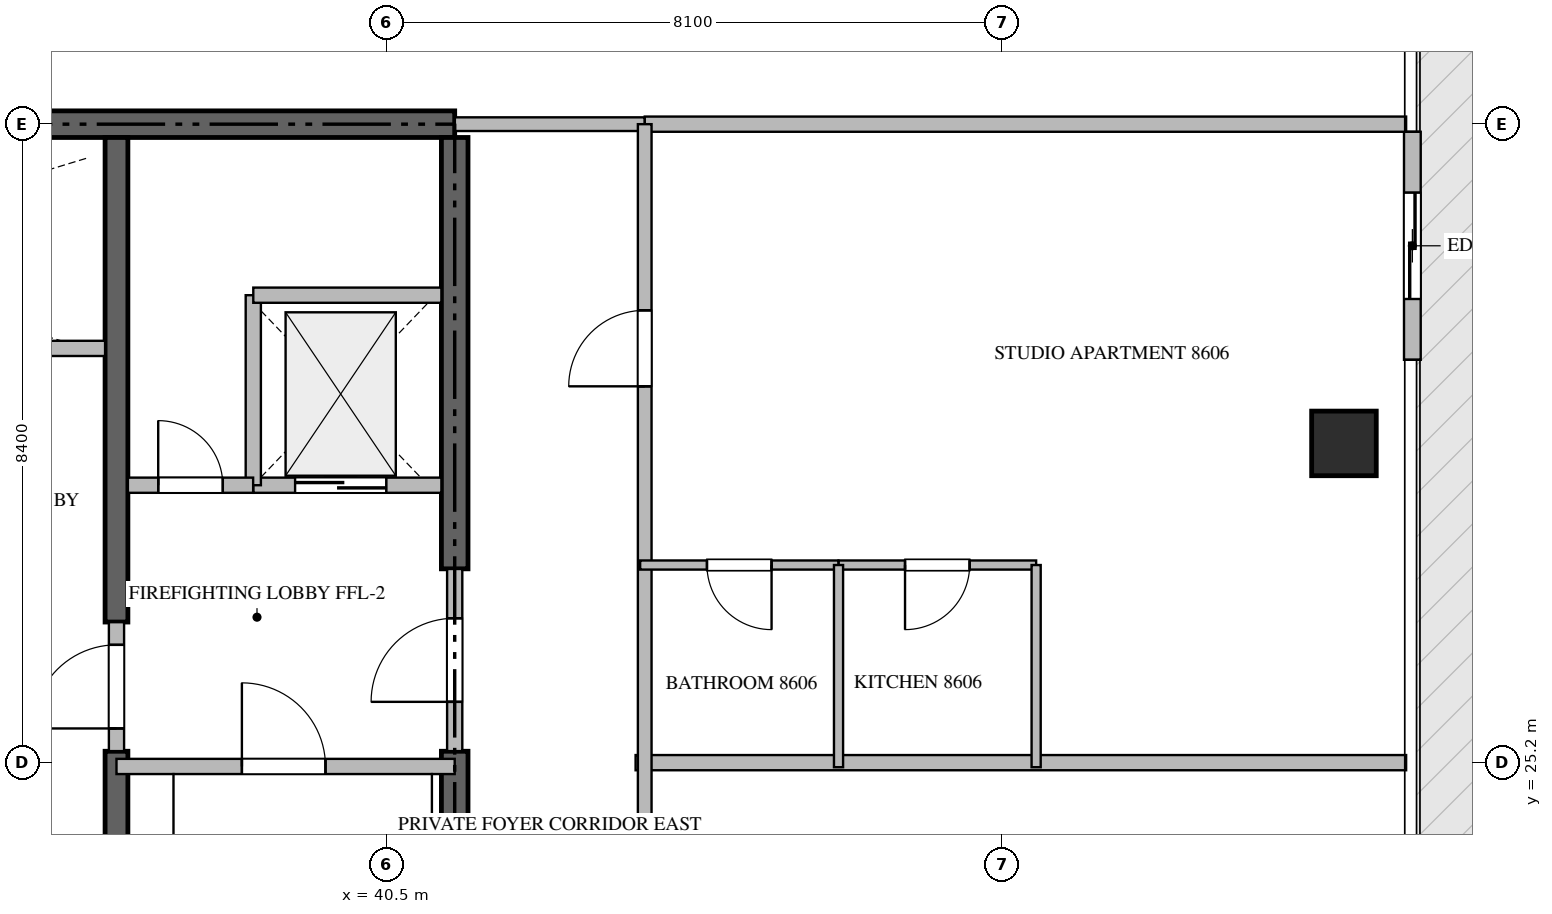
"""IFC4 building model, lengths in metres.
Left out: names, types, materials, properties, quantities, classifications, styles, units other than length and angle.
Written with IfcOpenShell. Run it as: python <this file> out.ifc"""

import sys

from ifc_helpers import new_model, si_unit, direction, frame, frame_2d, origin, origin_2d, place, context, subcontext, project, spatial, rectangle, extrude, source, transform, mapped, element, fill, save


model = new_model("IFC4")
c1 = context("Model", 3, precision=1e-05, world=origin(), true_north=direction((0.0, 1.0)))
c2 = subcontext(c1, "Body", "Model", "MODEL_VIEW")
j1 = project(units=[si_unit("LENGTHUNIT", "METRE"), si_unit("PLANEANGLEUNIT", "RADIAN")], contexts=[c1])
p1 = place(None, origin())
s1 = spatial("IfcSite", under=j1, at=p1, CompositionType="ELEMENT")
p2 = place(p1, origin())
s2 = spatial("IfcBuilding", under=s1, at=p2, CompositionType="ELEMENT")
p3 = place(p2, frame((0.0, 0.0, 347.95)))
s3 = spatial("IfcBuildingStorey", under=s2, at=p3, CompositionType="ELEMENT", Elevation=347.95)
p4 = place(p3, frame((41.4, 33.6, -0.26), z_axis=(0.0, 0.0, 1.0), x_axis=(-1.0, 0.0, 0.0)))
e1 = element("IfcWall", 1, at=p4, inside=s3, PredefinedType="SHEAR", context=c2, shape_type="SweptSolid", body=[
    extrude(rectangle(XDim=18.0, YDim=0.35, at=frame_2d((9.0, 0.0))), origin(), (0.0, 0.0, 1.0), 5.898),
])
p5 = place(p3, frame((41.4, 16.975, -0.26), z_axis=(0.0, 0.0, 1.0), x_axis=(0.0, 1.0, 0.0)))
e2 = element("IfcWall", 2, at=p5, inside=s3, PredefinedType="SHEAR", context=c2, shape_type="SweptSolid", body=[
    extrude(rectangle(XDim=8.375, YDim=0.35, at=frame_2d((4.188, 0.0))), origin(), (0.0, 0.0, 1.0), 5.898),
])
p6 = place(p3, frame((41.4, 27.75, -0.26), z_axis=(0.0, 0.0, 1.0), x_axis=(0.0, 1.0, 0.0)))
e3 = element("IfcWall", 3, at=p6, inside=s3, PredefinedType="SHEAR", context=c2, shape_type="SweptSolid", body=[
    extrude(rectangle(XDim=5.675, YDim=0.35, at=frame_2d((2.837, 0.0))), origin(), (0.0, 0.0, 1.0), 5.898),
])
p7 = place(p3, frame((36.95, 16.975, -0.26), z_axis=(0.0, 0.0, 1.0), x_axis=(0.0, 1.0, 0.0)))
e4 = element("IfcWall", 4, at=p7, inside=s3, PredefinedType="SHEAR", context=c2, shape_type="SweptSolid", body=[
    extrude(rectangle(XDim=8.375, YDim=0.3, at=frame_2d((4.188, 0.0))), origin(), (0.0, 0.0, 1.0), 5.898),
])
p8 = place(p3, frame((36.95, 27.05, -0.26), z_axis=(0.0, 0.0, 1.0), x_axis=(0.0, 1.0, 0.0)))
e5 = element("IfcWall", 5, at=p8, inside=s3, PredefinedType="SHEAR", context=c2, shape_type="SweptSolid", body=[
    extrude(rectangle(XDim=6.375, YDim=0.3, at=frame_2d((3.188, 0.0))), origin(), (0.0, 0.0, 1.0), 5.898),
])
m1 = source(origin(), c2, "Body", "SweptSolid", [
    extrude(rectangle(XDim=0.85, YDim=0.85, at=origin_2d()), origin(), (0.0, 0.0, 1.0), 5.9),
])
p9 = place(p3, frame((53.1, 29.4, -0.26), z_axis=(0.0, 0.0, 1.0), x_axis=(1.0, 0.0, 0.0)))
e6 = element("IfcColumn", 6, at=p9, inside=s3, PredefinedType="COLUMN", context=c2, shape_type="MappedRepresentation", body=[
    mapped(m1, transform((0.0, 0.0, 0.0), scale=1.0)),
])
p10 = place(p3, frame((54.0, 30.5, 0.0), z_axis=(0.0, 0.0, 1.0), x_axis=(0.0, 1.0, 0.0)))
e7 = element("IfcWall", 7, at=p10, inside=s3, PredefinedType="ELEMENTEDWALL", context=c2, shape_type="SweptSolid", body=[
    extrude(rectangle(XDim=3.0, YDim=0.22, at=frame_2d((1.5, 0.0))), origin(), (0.0, 0.0, 1.0), 5.625),
])
p11 = place(p10, frame((0.8, 0.0, 0.0)))
e8 = element("IfcOpeningElement", 8, at=p11, cuts=e7, PredefinedType="OPENING", context=c2, shape_type="SweptSolid", body=[
    extrude(rectangle(XDim=1.4, YDim=2.25, at=frame_2d((0.7, 1.125))), frame((0.0, 0.12, 0.0), z_axis=(0.0, -1.0, 0.0), x_axis=(1.0, 0.0, 0.0)), (0.0, 0.0, 1.0), 0.24),
])
p12 = place(p3, frame((36.95, 25.15, 0.0), z_axis=(0.0, 0.0, 1.0), x_axis=(1.0, 0.0, 0.0)))
e9 = element("IfcWall", 9, at=p12, inside=s3, PredefinedType="STANDARD", context=c2, shape_type="SweptSolid", body=[
    extrude(rectangle(XDim=4.45, YDim=0.2, at=frame_2d((2.225, 0.0))), origin(), (0.0, 0.0, 1.0), 5.64),
])
p13 = place(p12, frame((1.65, 0.0, 0.0)))
e10 = element("IfcOpeningElement", 10, at=p13, cuts=e9, PredefinedType="OPENING", context=c2, shape_type="SweptSolid", body=[
    extrude(rectangle(XDim=1.1, YDim=2.15, at=frame_2d((0.55, 1.075))), frame((0.0, 0.11, 0.0), z_axis=(0.0, -1.0, 0.0), x_axis=(1.0, 0.0, 0.0)), (0.0, 0.0, 1.0), 0.22),
])
p14 = place(p3, frame((38.75, 28.85, 0.0), z_axis=(0.0, 0.0, 1.0), x_axis=(1.0, 0.0, 0.0)))
e11 = element("IfcWall", 11, at=p14, inside=s3, PredefinedType="STANDARD", context=c2, shape_type="SweptSolid", body=[
    extrude(rectangle(XDim=2.475, YDim=0.2, at=frame_2d((1.238, 0.0))), origin(), (0.0, 0.0, 1.0), 5.64),
])
p15 = place(p14, frame((0.55, 0.0, 0.0)))
e12 = element("IfcOpeningElement", 12, at=p15, cuts=e11, PredefinedType="OPENING", context=c2, shape_type="SweptSolid", body=[
    extrude(rectangle(XDim=1.2, YDim=2.2, at=frame_2d((0.6, 1.1))), frame((0.0, 0.11, 0.0), z_axis=(0.0, -1.0, 0.0), x_axis=(1.0, 0.0, 0.0)), (0.0, 0.0, 1.0), 0.22),
])
p16 = place(p3, frame((35.0, 30.65, 0.0), z_axis=(0.0, 0.0, 1.0), x_axis=(1.0, 0.0, 0.0)))
e13 = element("IfcWall", 13, at=p16, inside=s3, PredefinedType="STANDARD", context=c2, shape_type="SweptSolid", body=[
    extrude(rectangle(XDim=1.8, YDim=0.2, at=frame_2d((0.9, 0.0))), origin(), (0.0, 0.0, 1.0), 5.64),
])
p17 = place(p3, frame((38.75, 28.85, 0.0), z_axis=(0.0, 0.0, 1.0), x_axis=(0.0, 1.0, 0.0)))
e14 = element("IfcWall", 14, at=p17, inside=s3, PredefinedType="STANDARD", context=c2, shape_type="SweptSolid", body=[
    extrude(rectangle(XDim=2.5, YDim=0.2, at=frame_2d((1.25, 0.0))), origin(), (0.0, 0.0, 1.0), 5.64),
])
p18 = place(p3, frame((38.75, 31.35, 0.0), z_axis=(0.0, 0.0, 1.0), x_axis=(1.0, 0.0, 0.0)))
e15 = element("IfcWall", 15, at=p18, inside=s3, PredefinedType="STANDARD", context=c2, shape_type="SweptSolid", body=[
    extrude(rectangle(XDim=2.475, YDim=0.2, at=frame_2d((1.238, 0.0))), origin(), (0.0, 0.0, 1.0), 5.64),
])
p19 = place(p3, frame((37.1, 28.85, 0.0), z_axis=(0.0, 0.0, 1.0), x_axis=(1.0, 0.0, 0.0)))
e16 = element("IfcWall", 16, at=p19, inside=s3, PredefinedType="STANDARD", context=c2, shape_type="SweptSolid", body=[
    extrude(rectangle(XDim=1.648, YDim=0.2, at=frame_2d((0.824, 0.0))), origin(), (0.0, 0.0, 1.0), 5.64),
])
p20 = place(p19, frame((0.399, 0.0, 0.0)))
e17 = element("IfcOpeningElement", 17, at=p20, cuts=e16, PredefinedType="OPENING", context=c2, shape_type="SweptSolid", body=[
    extrude(rectangle(XDim=0.85, YDim=2.1, at=frame_2d((0.425, 1.05))), frame((0.0, 0.11, 0.0), z_axis=(0.0, -1.0, 0.0), x_axis=(1.0, 0.0, 0.0)), (0.0, 0.0, 1.0), 0.22),
])
p21 = place(p3, frame((41.4, 25.352, 0.0), z_axis=(0.0, 0.0, 1.0), x_axis=(0.0, 1.0, 0.0)))
e18 = element("IfcWall", 18, at=p21, inside=s3, PredefinedType="STANDARD", context=c2, shape_type="SweptSolid", body=[
    extrude(rectangle(XDim=2.396, YDim=0.2, at=frame_2d((1.198, 0.0))), origin(), (0.0, 0.0, 1.0), 5.64),
])
p22 = place(p21, frame((0.648, 0.0, 0.0)))
e19 = element("IfcOpeningElement", 19, at=p22, cuts=e18, PredefinedType="OPENING", context=c2, shape_type="SweptSolid", body=[
    extrude(rectangle(XDim=1.1, YDim=2.15, at=frame_2d((0.55, 1.075))), frame((0.0, 0.11, 0.0), z_axis=(0.0, -1.0, 0.0), x_axis=(1.0, 0.0, 0.0)), (0.0, 0.0, 1.0), 0.22),
])
p23 = place(p3, frame((36.95, 25.352, 0.0), z_axis=(0.0, 0.0, 1.0), x_axis=(0.0, 1.0, 0.0)))
e20 = element("IfcWall", 20, at=p23, inside=s3, PredefinedType="STANDARD", context=c2, shape_type="SweptSolid", body=[
    extrude(rectangle(XDim=1.696, YDim=0.2, at=frame_2d((0.848, 0.0))), origin(), (0.0, 0.0, 1.0), 5.64),
])
p24 = place(p23, frame((0.298, 0.0, 0.0)))
e21 = element("IfcOpeningElement", 21, at=p24, cuts=e20, PredefinedType="OPENING", context=c2, shape_type="SweptSolid", body=[
    extrude(rectangle(XDim=1.1, YDim=2.15, at=frame_2d((0.55, 1.075))), frame((0.0, 0.11, 0.0), z_axis=(0.0, -1.0, 0.0), x_axis=(1.0, 0.0, 0.0)), (0.0, 0.0, 1.0), 0.22),
])
p25 = place(p3, frame((43.78, 25.2, 0.0), z_axis=(0.0, 0.0, 1.0), x_axis=(1.0, 0.0, 0.0)))
e22 = element("IfcWall", 22, at=p25, inside=s3, PredefinedType="PARTITIONING", context=c2, shape_type="SweptSolid", body=[
    extrude(rectangle(XDim=10.138, YDim=0.2, at=frame_2d((5.069, 0.0))), origin(), (0.0, 0.0, 1.0), 5.64),
])
p26 = place(p3, frame((43.9, 33.6, 0.0), z_axis=(0.0, 0.0, 1.0), x_axis=(1.0, 0.0, 0.0)))
e23 = element("IfcWall", 23, at=p26, inside=s3, PredefinedType="PARTITIONING", context=c2, shape_type="SweptSolid", body=[
    extrude(rectangle(XDim=10.018, YDim=0.2, at=frame_2d((5.009, 0.0))), origin(), (0.0, 0.0, 1.0), 5.64),
])
p27 = place(p3, frame((41.402, 33.6, 0.0), z_axis=(0.0, 0.0, 1.0), x_axis=(1.0, 0.0, 0.0)))
e24 = element("IfcWall", 24, at=p27, inside=s3, PredefinedType="PARTITIONING", context=c2, shape_type="SweptSolid", body=[
    extrude(rectangle(XDim=2.496, YDim=0.18, at=frame_2d((1.248, 0.0))), origin(), (0.0, 0.0, 1.0), 5.64),
])
p28 = place(p3, frame((43.9, 16.8, 0.0), z_axis=(0.0, 0.0, 1.0), x_axis=(0.0, 1.0, 0.0)))
e25 = element("IfcWall", 25, at=p28, inside=s3, PredefinedType="PARTITIONING", context=c2, shape_type="SweptSolid", body=[
    extrude(rectangle(XDim=16.8, YDim=0.18, at=frame_2d((8.4, 0.0))), origin(), (0.0, 0.0, 1.0), 5.64),
])
p29 = place(p28, frame((4.993, 0.0, 0.0)))
e26 = element("IfcOpeningElement", 26, at=p29, cuts=e25, PredefinedType="OPENING", context=c2, shape_type="SweptSolid", body=[
    extrude(rectangle(XDim=1.0, YDim=2.15, at=frame_2d((0.5, 1.075))), frame((0.0, 0.1, 0.0), z_axis=(0.0, -1.0, 0.0), x_axis=(1.0, 0.0, 0.0)), (0.0, 0.0, 1.0), 0.2),
])
p30 = place(p28, frame((13.351, 0.0, 0.0)))
e27 = element("IfcOpeningElement", 27, at=p30, cuts=e25, PredefinedType="OPENING", context=c2, shape_type="SweptSolid", body=[
    extrude(rectangle(XDim=1.0, YDim=2.15, at=frame_2d((0.5, 1.075))), frame((0.0, 0.1, 0.0), z_axis=(0.0, -1.0, 0.0), x_axis=(1.0, 0.0, 0.0)), (0.0, 0.0, 1.0), 0.2),
])
p31 = place(p3, frame((49.05, 27.8, 0.0), z_axis=(0.0, 0.0, 1.0), x_axis=(-1.0, 0.0, 0.0)))
e28 = element("IfcWall", 28, at=p31, inside=s3, PredefinedType="PARTITIONING", context=c2, shape_type="SweptSolid", body=[
    extrude(rectangle(XDim=2.6, YDim=0.12, at=frame_2d((1.3, 0.0))), origin(), (0.0, 0.0, 1.0), 5.64),
])
p32 = place(p31, frame((0.875, 0.0, 0.0)))
e29 = element("IfcOpeningElement", 29, at=p32, cuts=e28, PredefinedType="OPENING", context=c2, shape_type="SweptSolid", body=[
    extrude(rectangle(XDim=0.85, YDim=2.1, at=frame_2d((0.425, 1.05))), frame((0.0, 0.07, 0.0), z_axis=(0.0, -1.0, 0.0), x_axis=(1.0, 0.0, 0.0)), (0.0, 0.0, 1.0), 0.14),
])
p33 = place(p3, frame((46.448, 27.8, 0.0), z_axis=(0.0, 0.0, 1.0), x_axis=(-1.0, 0.0, 0.0)))
e30 = element("IfcWall", 30, at=p33, inside=s3, PredefinedType="PARTITIONING", context=c2, shape_type="SweptSolid", body=[
    extrude(rectangle(XDim=2.608, YDim=0.12, at=frame_2d((1.304, 0.0))), origin(), (0.0, 0.0, 1.0), 5.64),
])
p34 = place(p33, frame((0.879, 0.0, 0.0)))
e31 = element("IfcOpeningElement", 31, at=p34, cuts=e30, PredefinedType="OPENING", context=c2, shape_type="SweptSolid", body=[
    extrude(rectangle(XDim=0.85, YDim=2.1, at=frame_2d((0.425, 1.05))), frame((0.0, 0.07, 0.0), z_axis=(0.0, -1.0, 0.0), x_axis=(1.0, 0.0, 0.0)), (0.0, 0.0, 1.0), 0.14),
])
for number, where, z_axis, x_axis in (
    (32, (46.45, 25.14, 0.0), (0.0, 0.0, 1.0), (0.0, 1.0, 0.0)),
    (33, (49.05, 25.14, 0.0), (0.0, 0.0, 1.0), (0.0, 1.0, 0.0)),
):
    element("IfcWall", number, at=place(p3, frame(where, z_axis=z_axis, x_axis=x_axis)), inside=s3, PredefinedType="PARTITIONING", context=c2, shape_type="SweptSolid", body=[
        extrude(rectangle(XDim=2.66, YDim=0.12, at=frame_2d((1.33, 0.0))), origin(), (0.0, 0.0, 1.0), 5.64),
    ])
m2 = source(origin(), c2, "Body", "SweptSolid", [
    extrude(rectangle(XDim=1.4, YDim=2.25, at=frame_2d((0.7, 1.125))), frame((0.0, 0.025, 0.0), z_axis=(0.0, -1.0, 0.0), x_axis=(1.0, 0.0, 0.0)), (0.0, 0.0, 1.0), 0.05),
])
p35 = place(p11, origin())
e34 = element("IfcDoor", 34, at=p35, inside=s3, OperationType="SLIDING_TO_LEFT", PredefinedType="DOOR", context=c2, shape_type="MappedRepresentation", body=[
    mapped(m2, transform((0.0, 0.0, 0.0), scale=1.0)),
])
fill(e8, e34)
m3 = source(origin(), c2, "Body", "SweptSolid", [
    extrude(rectangle(XDim=1.1, YDim=2.15, at=frame_2d((0.55, 1.075))), frame((0.0, 0.025, 0.0), z_axis=(0.0, -1.0, 0.0), x_axis=(1.0, 0.0, 0.0)), (0.0, 0.0, 1.0), 0.05),
])
p36 = place(p13, origin())
e35 = element("IfcDoor", 35, at=p36, inside=s3, OperationType="SINGLE_SWING_LEFT", PredefinedType="DOOR", context=c2, shape_type="MappedRepresentation", body=[
    mapped(m3, transform((0.0, 0.0, 0.0), scale=1.0)),
])
fill(e10, e35)
m4 = source(origin(), c2, "Body", "SweptSolid", [
    extrude(rectangle(XDim=1.2, YDim=2.2, at=frame_2d((0.6, 1.1))), frame((0.0, 0.025, 0.0), z_axis=(0.0, -1.0, 0.0), x_axis=(1.0, 0.0, 0.0)), (0.0, 0.0, 1.0), 0.05),
])
p37 = place(p15, origin())
e36 = element("IfcDoor", 36, at=p37, inside=s3, OperationType="DOUBLE_DOOR_SLIDING", PredefinedType="DOOR", context=c2, shape_type="MappedRepresentation", body=[
    mapped(m4, transform((0.0, 0.0, 0.0), scale=1.0)),
])
fill(e12, e36)
m5 = source(origin(), c2, "Body", "SweptSolid", [
    extrude(rectangle(XDim=0.85, YDim=2.1, at=frame_2d((0.425, 1.05))), frame((0.0, 0.025, 0.0), z_axis=(0.0, -1.0, 0.0), x_axis=(1.0, 0.0, 0.0)), (0.0, 0.0, 1.0), 0.05),
])
p38 = place(p20, origin())
e37 = element("IfcDoor", 37, at=p38, inside=s3, OperationType="SINGLE_SWING_LEFT", PredefinedType="DOOR", context=c2, shape_type="MappedRepresentation", body=[
    mapped(m5, transform((0.0, 0.0, 0.0), scale=1.0)),
])
fill(e17, e37)
p39 = place(p22, origin())
e38 = element("IfcDoor", 38, at=p39, inside=s3, OperationType="SINGLE_SWING_LEFT", PredefinedType="DOOR", context=c2, shape_type="MappedRepresentation", body=[
    mapped(m3, transform((0.0, 0.0, 0.0), scale=1.0)),
])
fill(e19, e38)
p40 = place(p24, origin())
e39 = element("IfcDoor", 39, at=p40, inside=s3, OperationType="SINGLE_SWING_LEFT", PredefinedType="DOOR", context=c2, shape_type="MappedRepresentation", body=[
    mapped(m3, transform((0.0, 0.0, 0.0), scale=1.0)),
])
fill(e21, e39)
m6 = source(origin(), c2, "Body", "SweptSolid", [
    extrude(rectangle(XDim=1.0, YDim=2.15, at=frame_2d((0.5, 1.075))), frame((0.0, 0.025, 0.0), z_axis=(0.0, -1.0, 0.0), x_axis=(1.0, 0.0, 0.0)), (0.0, 0.0, 1.0), 0.05),
])
p41 = place(p30, origin())
e40 = element("IfcDoor", 40, at=p41, inside=s3, OperationType="SINGLE_SWING_LEFT", PredefinedType="DOOR", context=c2, shape_type="MappedRepresentation", body=[
    mapped(m6, transform((0.0, 0.0, 0.0), scale=1.0)),
])
fill(e27, e40)
p42 = place(p32, origin())
e41 = element("IfcDoor", 41, at=p42, inside=s3, OperationType="SINGLE_SWING_RIGHT", PredefinedType="DOOR", context=c2, shape_type="MappedRepresentation", body=[
    mapped(m5, transform((0.0, 0.0, 0.0), scale=1.0)),
])
fill(e29, e41)
p43 = place(p34, origin())
e42 = element("IfcDoor", 42, at=p43, inside=s3, OperationType="SINGLE_SWING_LEFT", PredefinedType="DOOR", context=c2, shape_type="MappedRepresentation", body=[
    mapped(m5, transform((0.0, 0.0, 0.0), scale=1.0)),
])
fill(e31, e42)
save(model, sys.argv[1])
